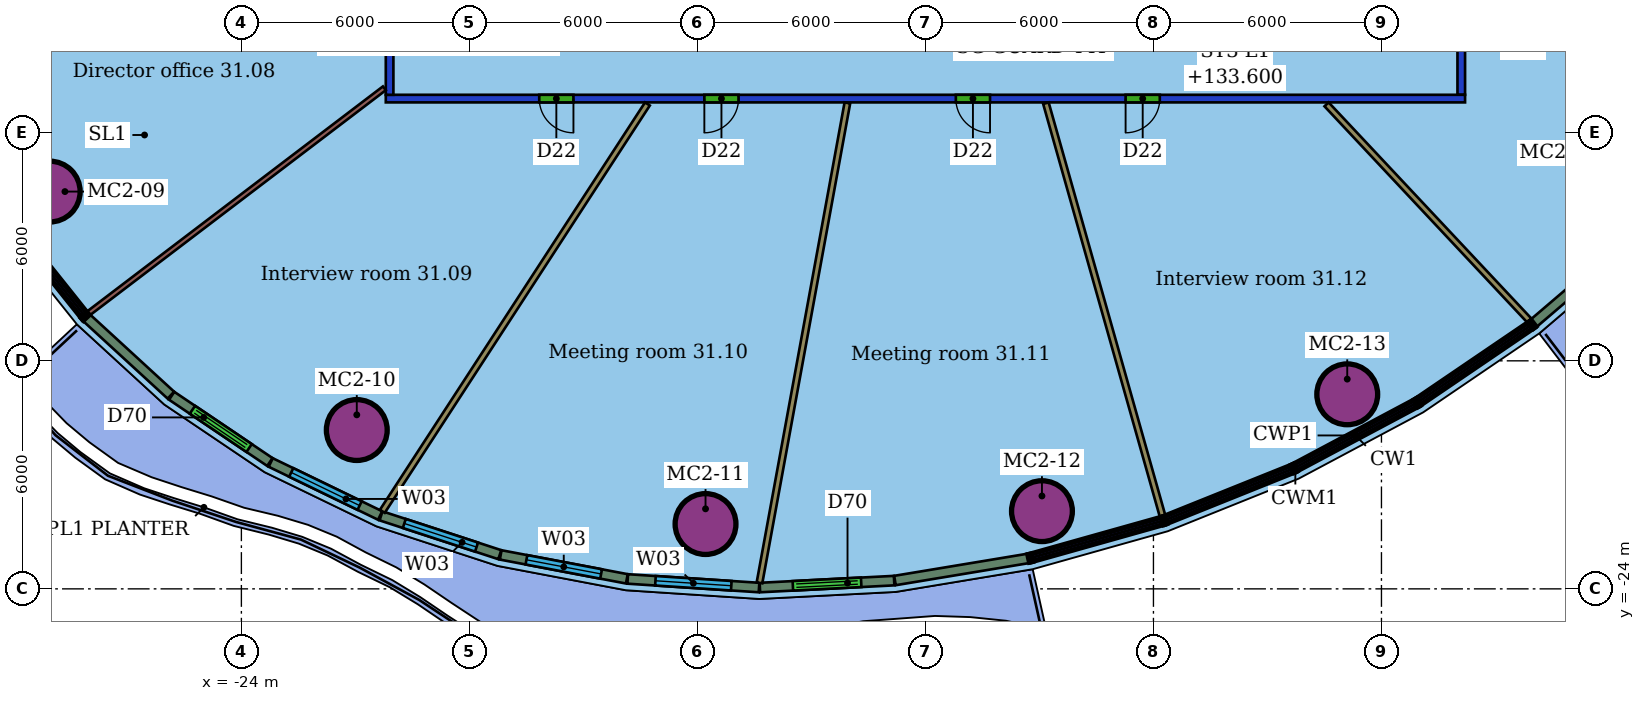
"""IFC4 building model, lengths in metres.
Left out: names, types, materials, properties, quantities, classifications, styles, units other than length and angle.
Written with IfcOpenShell. Run it as: python <this file> out.ifc"""

import sys

from ifc_helpers import new_model, si_unit, direction, frame, frame_2d, origin, origin_2d, place, context, subcontext, project, spatial, rectangle, hollow_circle, extrude, element, fill, save


model = new_model("IFC4")
c1 = context("Model", 3, precision=1e-05, world=origin(), true_north=direction((0.0, 1.0)))
c2 = subcontext(c1, "Body", "Model", "MODEL_VIEW")
j1 = project(units=[si_unit("LENGTHUNIT", "METRE"), si_unit("PLANEANGLEUNIT", "RADIAN")], contexts=[c1])
p1 = place(None, origin())
s1 = spatial("IfcSite", under=j1, at=p1, CompositionType="ELEMENT")
p2 = place(p1, origin())
s2 = spatial("IfcBuilding", under=s1, at=p2, CompositionType="ELEMENT")
p3 = place(p2, frame((0.0, 0.0, 131.8)))
s3 = spatial("IfcBuildingStorey", under=s2, at=p3, CompositionType="ELEMENT", Elevation=131.8)
for number, where, z_axis, x_axis in (
    (1, (-29.043, -13.547, 0.0), (0.0, 0.0, 1.0), (1.0, 0.0, 0.0)),
    (2, (-20.963, -19.821, 0.0), (0.0, 0.0, 1.0), (1.0, 0.0, 0.0)),
    (3, (-11.787, -22.294, 0.0), (0.0, 0.0, 1.0), (1.0, 0.0, 0.0)),
    (4, (-2.934, -21.956, 0.0), (0.0, 0.0, 1.0), (1.0, 0.0, 0.0)),
    (5, (5.1, -18.881, 0.0), (0.0, 0.0, 1.0), (1.0, 0.0, 0.0)),
):
    element("IfcColumn", number, at=place(p3, frame(where, z_axis=z_axis, x_axis=x_axis)), inside=s3, PredefinedType="COLUMN", context=c2, shape_type="SweptSolid", body=[
        extrude(hollow_circle(Radius=0.8, WallThickness=0.055, at=origin_2d()), origin(), (0.0, 0.0, 1.0), 3.4),
    ])
p4 = place(p3, frame((8.2, -11.1, 0.0), z_axis=(0.0, 0.0, 1.0), x_axis=(-1.0, 0.0, 0.0)))
e6 = element("IfcWall", 6, at=p4, inside=s3, PredefinedType="PARTITIONING", context=c2, shape_type="SweptSolid", body=[
    extrude(rectangle(XDim=28.4, YDim=0.2, at=frame_2d((14.2, 0.0))), origin(), (0.0, 0.0, 1.0), 2.95),
])
p5 = place(p4, frame((23.462, 0.0, 0.0)))
e7 = element("IfcOpeningElement", 7, at=p5, cuts=e6, PredefinedType="OPENING", context=c2, shape_type="SweptSolid", body=[
    extrude(rectangle(XDim=0.9, YDim=2.1, at=frame_2d((0.45, 1.05))), frame((0.0, 0.11, 0.0), z_axis=(0.0, -1.0, 0.0), x_axis=(1.0, 0.0, 0.0)), (0.0, 0.0, 1.0), 0.22),
])
p6 = place(p4, frame((19.118, 0.0, 0.0)))
e8 = element("IfcOpeningElement", 8, at=p6, cuts=e6, PredefinedType="OPENING", context=c2, shape_type="SweptSolid", body=[
    extrude(rectangle(XDim=0.9, YDim=2.1, at=frame_2d((0.45, 1.05))), frame((0.0, 0.11, 0.0), z_axis=(0.0, -1.0, 0.0), x_axis=(1.0, 0.0, 0.0)), (0.0, 0.0, 1.0), 0.22),
])
p7 = place(p4, frame((12.5, 0.0, 0.0)))
e9 = element("IfcOpeningElement", 9, at=p7, cuts=e6, PredefinedType="OPENING", context=c2, shape_type="SweptSolid", body=[
    extrude(rectangle(XDim=0.9, YDim=2.1, at=frame_2d((0.45, 1.05))), frame((0.0, 0.11, 0.0), z_axis=(0.0, -1.0, 0.0), x_axis=(1.0, 0.0, 0.0)), (0.0, 0.0, 1.0), 0.22),
])
p8 = place(p4, frame((8.033, 0.0, 0.0)))
e10 = element("IfcOpeningElement", 10, at=p8, cuts=e6, PredefinedType="OPENING", context=c2, shape_type="SweptSolid", body=[
    extrude(rectangle(XDim=0.9, YDim=2.1, at=frame_2d((0.45, 1.05))), frame((0.0, 0.11, 0.0), z_axis=(0.0, -1.0, 0.0), x_axis=(1.0, 0.0, 0.0)), (0.0, 0.0, 1.0), 0.22),
])
p9 = place(p3, frame((-20.1, -11.0, 0.0), z_axis=(0.0, 0.0, 1.0), x_axis=(0.0, 1.0, 0.0)))
e11 = element("IfcWall", 11, at=p9, inside=s3, PredefinedType="PARTITIONING", context=c2, shape_type="SweptSolid", body=[
    extrude(rectangle(XDim=22.0, YDim=0.2, at=frame_2d((11.0, 0.0))), origin(), (0.0, 0.0, 1.0), 2.95),
])
p10 = place(p9, frame((18.223, 0.0, 0.0)))
e12 = element("IfcOpeningElement", 12, at=p10, cuts=e11, PredefinedType="OPENING", context=c2, shape_type="SweptSolid", body=[
    extrude(rectangle(XDim=0.9, YDim=2.1, at=frame_2d((0.45, 1.05))), frame((0.0, 0.11, 0.0), z_axis=(0.0, -1.0, 0.0), x_axis=(1.0, 0.0, 0.0)), (0.0, 0.0, 1.0), 0.22),
])
p11 = place(p9, frame((13.758, 0.0, 0.0)))
e13 = element("IfcOpeningElement", 13, at=p11, cuts=e11, PredefinedType="OPENING", context=c2, shape_type="SweptSolid", body=[
    extrude(rectangle(XDim=1.5, YDim=2.1, at=frame_2d((0.75, 1.05))), frame((0.0, 0.11, 0.0), z_axis=(0.0, -1.0, 0.0), x_axis=(1.0, 0.0, 0.0)), (0.0, 0.0, 1.0), 0.22),
])
p12 = place(p9, frame((7.252, 0.0, 0.0)))
e14 = element("IfcOpeningElement", 14, at=p12, cuts=e11, PredefinedType="OPENING", context=c2, shape_type="SweptSolid", body=[
    extrude(rectangle(XDim=1.8, YDim=2.4, at=frame_2d((0.9, 1.2))), frame((0.0, 0.11, 0.0), z_axis=(0.0, -1.0, 0.0), x_axis=(1.0, 0.0, 0.0)), (0.0, 0.0, 1.0), 0.22),
])
p13 = place(p9, frame((3.502, 0.0, 0.0)))
e15 = element("IfcOpeningElement", 15, at=p13, cuts=e11, PredefinedType="OPENING", context=c2, shape_type="SweptSolid", body=[
    extrude(rectangle(XDim=1.0, YDim=2.4, at=frame_2d((0.5, 1.2))), frame((0.0, 0.11, 0.0), z_axis=(0.0, -1.0, 0.0), x_axis=(1.0, 0.0, 0.0)), (0.0, 0.0, 1.0), 0.22),
])
p14 = place(p3, frame((8.1, 11.0, 0.0), z_axis=(0.0, 0.0, 1.0), x_axis=(0.0, -1.0, 0.0)))
e16 = element("IfcWall", 16, at=p14, inside=s3, PredefinedType="PARTITIONING", context=c2, shape_type="SweptSolid", body=[
    extrude(rectangle(XDim=22.0, YDim=0.2, at=frame_2d((11.0, 0.0))), origin(), (0.0, 0.0, 1.0), 2.95),
])
p15 = place(p14, frame((18.043, 0.0, 0.0)))
e17 = element("IfcOpeningElement", 17, at=p15, cuts=e16, PredefinedType="OPENING", context=c2, shape_type="SweptSolid", body=[
    extrude(rectangle(XDim=1.5, YDim=2.1, at=frame_2d((0.75, 1.05))), frame((0.0, 0.11, 0.0), z_axis=(0.0, -1.0, 0.0), x_axis=(1.0, 0.0, 0.0)), (0.0, 0.0, 1.0), 0.22),
])
p16 = place(p14, frame((14.113, 0.0, 0.0)))
e18 = element("IfcOpeningElement", 18, at=p16, cuts=e16, PredefinedType="OPENING", context=c2, shape_type="SweptSolid", body=[
    extrude(rectangle(XDim=1.0, YDim=2.4, at=frame_2d((0.5, 1.2))), frame((0.0, 0.11, 0.0), z_axis=(0.0, -1.0, 0.0), x_axis=(1.0, 0.0, 0.0)), (0.0, 0.0, 1.0), 0.22),
])
p17 = place(p14, frame((7.247, 0.0, 0.0)))
e19 = element("IfcOpeningElement", 19, at=p17, cuts=e16, PredefinedType="OPENING", context=c2, shape_type="SweptSolid", body=[
    extrude(rectangle(XDim=1.8, YDim=2.4, at=frame_2d((0.9, 1.2))), frame((0.0, 0.11, 0.0), z_axis=(0.0, -1.0, 0.0), x_axis=(1.0, 0.0, 0.0)), (0.0, 0.0, 1.0), 0.22),
])
p18 = place(p14, frame((3.502, 0.0, 0.0)))
e20 = element("IfcOpeningElement", 20, at=p18, cuts=e16, PredefinedType="OPENING", context=c2, shape_type="SweptSolid", body=[
    extrude(rectangle(XDim=1.0, YDim=2.4, at=frame_2d((0.5, 1.2))), frame((0.0, 0.11, 0.0), z_axis=(0.0, -1.0, 0.0), x_axis=(1.0, 0.0, 0.0)), (0.0, 0.0, 1.0), 0.22),
])
p19 = place(p3, frame((-28.02, -16.748, 0.0), z_axis=(0.0, 0.0, 1.0), x_axis=(0.795936459637, 0.605380171644, 0.0)))
e21 = element("IfcWall", 21, at=p19, inside=s3, PredefinedType="PARTITIONING", context=c2, shape_type="SweptSolid", body=[
    extrude(rectangle(XDim=9.777, YDim=0.125, at=frame_2d((4.888, 0.0))), origin(), (0.0, 0.0, 1.0), 3.4),
])
p20 = place(p3, frame((-20.291, -21.959, 0.0), z_axis=(0.0, 0.0, 1.0), x_axis=(0.545467381377, 0.838132051561, 0.0)))
e22 = element("IfcWall", 22, at=p20, inside=s3, PredefinedType="PARTITIONING", context=c2, shape_type="SweptSolid", body=[
    extrude(rectangle(XDim=12.788, YDim=0.15, at=frame_2d((6.394, 0.0))), origin(), (0.0, 0.0, 1.0), 3.4),
])
p21 = place(p3, frame((-10.366, -23.841, 0.0), z_axis=(0.0, 0.0, 1.0), x_axis=(0.180155525348, 0.983638138081, 0.0)))
e23 = element("IfcWall", 23, at=p21, inside=s3, PredefinedType="PARTITIONING", context=c2, shape_type="SweptSolid", body=[
    extrude(rectangle(XDim=12.837, YDim=0.15, at=frame_2d((6.419, 0.0))), origin(), (0.0, 0.0, 1.0), 3.4),
])
p22 = place(p3, frame((0.239, -22.082, 0.0), z_axis=(0.0, 0.0, 1.0), x_axis=(-0.271903007498, 0.962324661699, 0.0)))
e24 = element("IfcWall", 24, at=p22, inside=s3, PredefinedType="PARTITIONING", context=c2, shape_type="SweptSolid", body=[
    extrude(rectangle(XDim=11.287, YDim=0.15, at=frame_2d((5.643, 0.0))), origin(), (0.0, 0.0, 1.0), 3.4),
])
p23 = place(p3, frame((9.893, -16.941, 0.0), z_axis=(0.0, 0.0, 1.0), x_axis=(-0.684185696534, 0.729307844917, 0.0)))
e25 = element("IfcWall", 25, at=p23, inside=s3, PredefinedType="PARTITIONING", context=c2, shape_type="SweptSolid", body=[
    extrude(rectangle(XDim=7.802, YDim=0.15, at=frame_2d((3.901, 0.0))), origin(), (0.0, 0.0, 1.0), 3.4),
])
p24 = place(p3, frame((-28.07, -16.87, 0.0), z_axis=(0.0, 0.0, 1.0), x_axis=(0.736827064846, -0.676081264724, 0.0)))
e26 = element("IfcWall", 26, at=p24, inside=s3, PredefinedType="SOLIDWALL", context=c2, shape_type="SweptSolid", body=[
    extrude(rectangle(XDim=3.006, YDim=0.25, at=frame_2d((1.503, 0.0))), origin(), (0.0, 0.0, 1.0), 3.0),
])
p25 = place(p3, frame((-25.834, -18.919, 0.0), z_axis=(0.0, 0.0, 1.0), x_axis=(0.829037505095, -0.559193003484, 0.0)))
e27 = element("IfcWall", 27, at=p25, inside=s3, PredefinedType="SOLIDWALL", context=c2, shape_type="SweptSolid", body=[
    extrude(rectangle(XDim=3.117, YDim=0.25, at=frame_2d((1.559, 0.0))), origin(), (0.0, 0.0, 1.0), 3.0),
])
p26 = place(p25, frame((0.658, 0.0, 0.0)))
e28 = element("IfcOpeningElement", 28, at=p26, cuts=e27, PredefinedType="OPENING", context=c2, shape_type="SweptSolid", body=[
    extrude(rectangle(XDim=1.8, YDim=2.4, at=frame_2d((0.9, 1.2))), frame((0.0, 0.135, 0.0), z_axis=(0.0, -1.0, 0.0), x_axis=(1.0, 0.0, 0.0)), (0.0, 0.0, 1.0), 0.27),
])
p27 = place(p3, frame((-23.228, -20.675, 0.0), z_axis=(0.0, 0.0, 1.0), x_axis=(0.899958400028, -0.435975777102, 0.0)))
e29 = element("IfcWall", 29, at=p27, inside=s3, PredefinedType="SOLIDWALL", context=c2, shape_type="SweptSolid", body=[
    extrude(rectangle(XDim=3.199, YDim=0.25, at=frame_2d((1.6, 0.0))), origin(), (0.0, 0.0, 1.0), 3.0),
])
p28 = place(p27, frame((0.6, 0.0, 0.9)))
e30 = element("IfcOpeningElement", 30, at=p28, cuts=e29, PredefinedType="OPENING", context=c2, shape_type="SweptSolid", body=[
    extrude(rectangle(XDim=2.0, YDim=2.1, at=frame_2d((1.0, 1.05))), frame((0.0, 0.135, 0.0), z_axis=(0.0, -1.0, 0.0), x_axis=(1.0, 0.0, 0.0)), (0.0, 0.0, 1.0), 0.27),
])
p29 = place(p3, frame((-20.326, -22.079, 0.0), z_axis=(0.0, 0.0, 1.0), x_axis=(0.950530319669, -0.310631793915, 0.0)))
e31 = element("IfcWall", 31, at=p29, inside=s3, PredefinedType="SOLIDWALL", context=c2, shape_type="SweptSolid", body=[
    extrude(rectangle(XDim=3.288, YDim=0.25, at=frame_2d((1.644, 0.0))), origin(), (0.0, 0.0, 1.0), 3.0),
])
p30 = place(p29, frame((0.644, 0.0, 0.9)))
e32 = element("IfcOpeningElement", 32, at=p30, cuts=e31, PredefinedType="OPENING", context=c2, shape_type="SweptSolid", body=[
    extrude(rectangle(XDim=2.0, YDim=2.1, at=frame_2d((1.0, 1.05))), frame((0.0, 0.135, 0.0), z_axis=(0.0, -1.0, 0.0), x_axis=(1.0, 0.0, 0.0)), (0.0, 0.0, 1.0), 0.27),
])
p31 = place(p3, frame((-17.177, -23.107, 0.0), z_axis=(0.0, 0.0, 1.0), x_axis=(0.982478083438, -0.186378152055, 0.0)))
e33 = element("IfcWall", 33, at=p31, inside=s3, PredefinedType="SOLIDWALL", context=c2, shape_type="SweptSolid", body=[
    extrude(rectangle(XDim=3.378, YDim=0.25, at=frame_2d((1.689, 0.0))), origin(), (0.0, 0.0, 1.0), 3.0),
])
p32 = place(p31, frame((0.689, 0.0, 0.9)))
e34 = element("IfcOpeningElement", 34, at=p32, cuts=e33, PredefinedType="OPENING", context=c2, shape_type="SweptSolid", body=[
    extrude(rectangle(XDim=2.0, YDim=2.1, at=frame_2d((1.0, 1.05))), frame((0.0, 0.135, 0.0), z_axis=(0.0, -1.0, 0.0), x_axis=(1.0, 0.0, 0.0)), (0.0, 0.0, 1.0), 0.27),
])
p33 = place(p3, frame((-13.834, -23.739, 0.0), z_axis=(0.0, 0.0, 1.0), x_axis=(0.997871338214, -0.065213437039, 0.0)))
e35 = element("IfcWall", 35, at=p33, inside=s3, PredefinedType="SOLIDWALL", context=c2, shape_type="SweptSolid", body=[
    extrude(rectangle(XDim=3.463, YDim=0.25, at=frame_2d((1.731, 0.0))), origin(), (0.0, 0.0, 1.0), 3.0),
])
p34 = place(p33, frame((0.731, 0.0, 0.9)))
e36 = element("IfcOpeningElement", 36, at=p34, cuts=e35, PredefinedType="OPENING", context=c2, shape_type="SweptSolid", body=[
    extrude(rectangle(XDim=2.0, YDim=2.1, at=frame_2d((1.0, 1.05))), frame((0.0, 0.135, 0.0), z_axis=(0.0, -1.0, 0.0), x_axis=(1.0, 0.0, 0.0)), (0.0, 0.0, 1.0), 0.27),
])
p35 = place(p3, frame((-10.356, -23.965, 0.0), z_axis=(0.0, 0.0, 1.0), x_axis=(0.998669769299, 0.051562504677, 0.0)))
e37 = element("IfcWall", 37, at=p35, inside=s3, PredefinedType="SOLIDWALL", context=c2, shape_type="SweptSolid", body=[
    extrude(rectangle(XDim=3.537, YDim=0.25, at=frame_2d((1.769, 0.0))), origin(), (0.0, 0.0, 1.0), 3.0),
])
p36 = place(p35, frame((0.869, 0.0, 0.0)))
e38 = element("IfcOpeningElement", 38, at=p36, cuts=e37, PredefinedType="OPENING", context=c2, shape_type="SweptSolid", body=[
    extrude(rectangle(XDim=1.8, YDim=2.4, at=frame_2d((0.9, 1.2))), frame((0.0, 0.135, 0.0), z_axis=(0.0, -1.0, 0.0), x_axis=(1.0, 0.0, 0.0)), (0.0, 0.0, 1.0), 0.27),
])
for number, where, z_axis, x_axis in (
    (39, (-6.802, -23.781, 0.0), (0.0, 0.0, 1.0), (0.987, 0.164, 0.0)),
    (40, (10.011, -17.005, 0.0), (0.0, 0.0, 1.0), (0.76, 0.649, 0.0)),
):
    element("IfcWall", number, at=place(p3, frame(where, z_axis=z_axis, x_axis=x_axis)), inside=s3, PredefinedType="SOLIDWALL", context=c2, shape_type="SweptSolid", body=[
        extrude(rectangle(XDim=3.552, YDim=0.25, at=frame_2d((1.776, 0.0))), origin(), (0.0, 0.0, 1.0), 3.0),
    ])
p37 = place(p5, origin())
e41 = element("IfcDoor", 41, at=p37, inside=s3, OperationType="SINGLE_SWING_LEFT", PredefinedType="DOOR", context=c2, shape_type="SweptSolid", body=[
    extrude(rectangle(XDim=0.9, YDim=2.1, at=frame_2d((0.45, 1.05))), frame((0.0, 0.025, 0.0), z_axis=(0.0, -1.0, 0.0), x_axis=(1.0, 0.0, 0.0)), (0.0, 0.0, 1.0), 0.05),
])
fill(e7, e41)
p38 = place(p6, origin())
e42 = element("IfcDoor", 42, at=p38, inside=s3, OperationType="SINGLE_SWING_RIGHT", PredefinedType="DOOR", context=c2, shape_type="SweptSolid", body=[
    extrude(rectangle(XDim=0.9, YDim=2.1, at=frame_2d((0.45, 1.05))), frame((0.0, 0.025, 0.0), z_axis=(0.0, -1.0, 0.0), x_axis=(1.0, 0.0, 0.0)), (0.0, 0.0, 1.0), 0.05),
])
fill(e8, e42)
p39 = place(p7, origin())
e43 = element("IfcDoor", 43, at=p39, inside=s3, OperationType="SINGLE_SWING_LEFT", PredefinedType="DOOR", context=c2, shape_type="SweptSolid", body=[
    extrude(rectangle(XDim=0.9, YDim=2.1, at=frame_2d((0.45, 1.05))), frame((0.0, 0.025, 0.0), z_axis=(0.0, -1.0, 0.0), x_axis=(1.0, 0.0, 0.0)), (0.0, 0.0, 1.0), 0.05),
])
fill(e9, e43)
p40 = place(p8, origin())
e44 = element("IfcDoor", 44, at=p40, inside=s3, OperationType="SINGLE_SWING_RIGHT", PredefinedType="DOOR", context=c2, shape_type="SweptSolid", body=[
    extrude(rectangle(XDim=0.9, YDim=2.1, at=frame_2d((0.45, 1.05))), frame((0.0, 0.025, 0.0), z_axis=(0.0, -1.0, 0.0), x_axis=(1.0, 0.0, 0.0)), (0.0, 0.0, 1.0), 0.05),
])
fill(e10, e44)
p41 = place(p26, origin())
e45 = element("IfcDoor", 45, at=p41, inside=s3, OperationType="DOUBLE_DOOR_SLIDING", PredefinedType="DOOR", context=c2, shape_type="SweptSolid", body=[
    extrude(rectangle(XDim=1.8, YDim=2.4, at=frame_2d((0.9, 1.2))), frame((0.0, 0.025, 0.0), z_axis=(0.0, -1.0, 0.0), x_axis=(1.0, 0.0, 0.0)), (0.0, 0.0, 1.0), 0.05),
])
fill(e28, e45)
p42 = place(p28, origin())
e46 = element("IfcWindow", 46, at=p42, inside=s3, PartitioningType="SINGLE_PANEL", PredefinedType="WINDOW", context=c2, shape_type="SweptSolid", body=[
    extrude(rectangle(XDim=2.0, YDim=2.1, at=frame_2d((1.0, 1.05))), frame((0.0, 0.03, 0.0), z_axis=(0.0, -1.0, 0.0), x_axis=(1.0, 0.0, 0.0)), (0.0, 0.0, 1.0), 0.06),
])
fill(e30, e46)
p43 = place(p30, origin())
e47 = element("IfcWindow", 47, at=p43, inside=s3, PartitioningType="SINGLE_PANEL", PredefinedType="WINDOW", context=c2, shape_type="SweptSolid", body=[
    extrude(rectangle(XDim=2.0, YDim=2.1, at=frame_2d((1.0, 1.05))), frame((0.0, 0.03, 0.0), z_axis=(0.0, -1.0, 0.0), x_axis=(1.0, 0.0, 0.0)), (0.0, 0.0, 1.0), 0.06),
])
fill(e32, e47)
p44 = place(p32, origin())
e48 = element("IfcWindow", 48, at=p44, inside=s3, PartitioningType="SINGLE_PANEL", PredefinedType="WINDOW", context=c2, shape_type="SweptSolid", body=[
    extrude(rectangle(XDim=2.0, YDim=2.1, at=frame_2d((1.0, 1.05))), frame((0.0, 0.03, 0.0), z_axis=(0.0, -1.0, 0.0), x_axis=(1.0, 0.0, 0.0)), (0.0, 0.0, 1.0), 0.06),
])
fill(e34, e48)
p45 = place(p34, origin())
e49 = element("IfcWindow", 49, at=p45, inside=s3, PartitioningType="SINGLE_PANEL", PredefinedType="WINDOW", context=c2, shape_type="SweptSolid", body=[
    extrude(rectangle(XDim=2.0, YDim=2.1, at=frame_2d((1.0, 1.05))), frame((0.0, 0.03, 0.0), z_axis=(0.0, -1.0, 0.0), x_axis=(1.0, 0.0, 0.0)), (0.0, 0.0, 1.0), 0.06),
])
fill(e36, e49)
p46 = place(p36, origin())
e50 = element("IfcDoor", 50, at=p46, inside=s3, OperationType="DOUBLE_DOOR_SLIDING", PredefinedType="DOOR", context=c2, shape_type="SweptSolid", body=[
    extrude(rectangle(XDim=1.8, YDim=2.4, at=frame_2d((0.9, 1.2))), frame((0.0, 0.025, 0.0), z_axis=(0.0, -1.0, 0.0), x_axis=(1.0, 0.0, 0.0)), (0.0, 0.0, 1.0), 0.05),
])
fill(e38, e50)
save(model, sys.argv[1])
